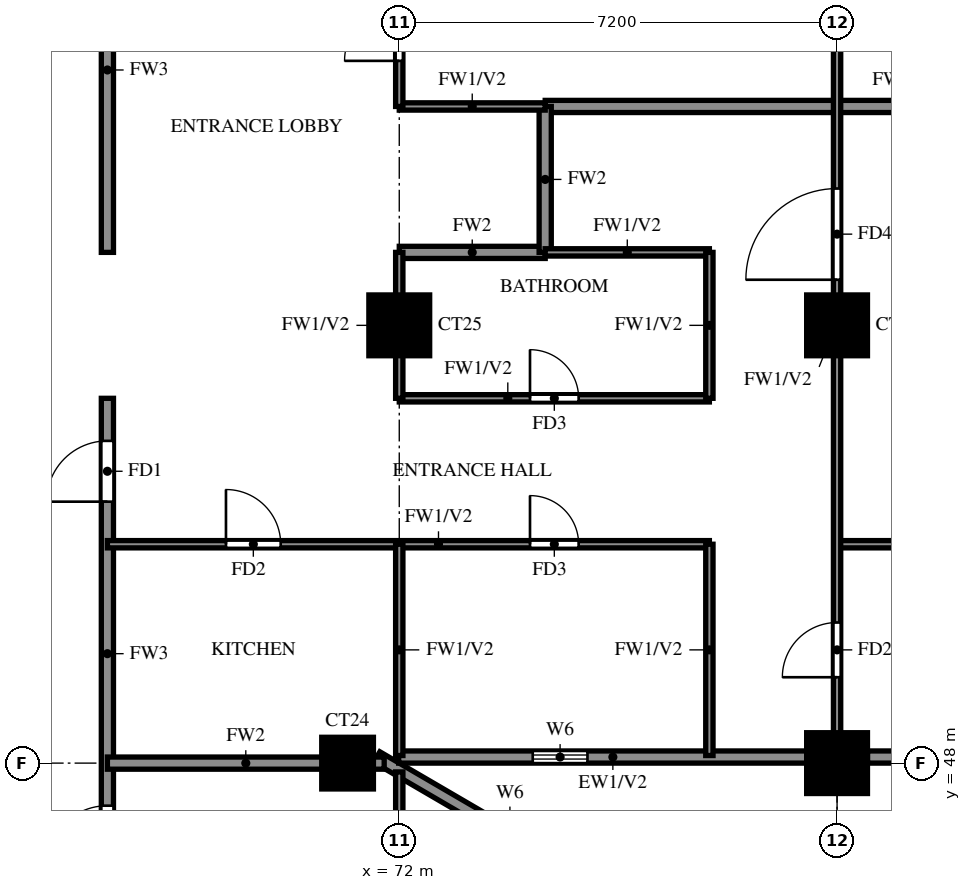
"""IFC4 building model, lengths in metres.
Left out: names, types, materials, properties, quantities, classifications, styles, units other than length and angle.
Written with IfcOpenShell. Run it as: python <this file> out.ifc"""

import sys

from ifc_helpers import new_model, si_unit, direction, frame, frame_2d, origin, origin_2d, place, context, subcontext, project, spatial, rectangle, extrude, source, transform, mapped, element, fill, save


model = new_model("IFC4")
c1 = context("Model", 3, precision=1e-05, world=origin(), true_north=direction((0.0, 1.0)))
c2 = subcontext(c1, "Body", "Model", "MODEL_VIEW")
j1 = project(units=[si_unit("LENGTHUNIT", "METRE"), si_unit("PLANEANGLEUNIT", "RADIAN")], contexts=[c1])
p1 = place(None, origin())
s1 = spatial("IfcSite", under=j1, at=p1, CompositionType="ELEMENT")
p2 = place(p1, origin())
s2 = spatial("IfcBuilding", under=s1, at=p2, CompositionType="ELEMENT")
p3 = place(p2, frame((0.0, 0.0, 146.5)))
s3 = spatial("IfcBuildingStorey", under=s2, at=p3, CompositionType="ELEMENT", Elevation=146.5)
m1 = source(origin(), c2, "Body", "SweptSolid", [
    extrude(rectangle(XDim=0.85, YDim=0.85, at=origin_2d()), origin(), (0.0, 0.0, 1.0), 3.2),
])
p4 = place(p3, frame((71.15, 48.0, 0.0), z_axis=(0.0, 0.0, 1.0), x_axis=(1.0, 0.0, 0.0)))
e1 = element("IfcColumn", 1, at=p4, inside=s3, PredefinedType="COLUMN", context=c2, shape_type="MappedRepresentation", body=[
    mapped(m1, transform((0.0, 0.0, 0.0))),
])
m2 = source(origin(), c2, "Body", "SweptSolid", [
    extrude(rectangle(XDim=1.0, YDim=1.0, at=origin_2d()), origin(), (0.0, 0.0, 1.0), 3.2),
])
for number, where, z_axis, x_axis in (
    (2, (79.2, 48.0, 0.0), (0.0, 0.0, 1.0), (1.0, 0.0, 0.0)),
    (3, (72.0, 55.2, 0.0), (0.0, 0.0, 1.0), (1.0, 0.0, 0.0)),
    (4, (79.2, 55.2, 0.0), (0.0, 0.0, 1.0), (1.0, 0.0, 0.0)),
):
    element("IfcColumn", number, at=place(p3, frame(where, z_axis=z_axis, x_axis=x_axis)), inside=s3, PredefinedType="COLUMN", context=c2, shape_type="MappedRepresentation", body=[
        mapped(m2, transform((0.0, 0.0, 0.0))),
    ])
p5 = place(p3, frame((85.719, 39.881, 0.0), z_axis=(0.0, 0.0, 1.0), x_axis=(-0.86377618652, 0.503875678716, 0.0)))
e5 = element("IfcWall", 5, at=p5, inside=s3, PredefinedType="SOLIDWALL", context=c2, shape_type="SweptSolid", body=[
    extrude(rectangle(XDim=16.311, YDim=0.2, at=frame_2d((8.156, 0.0))), origin(), (0.0, 0.0, 1.0), 3.2),
])
p6 = place(p5, frame((13.326, 0.0, 1.5)))
e6 = element("IfcOpeningElement", 6, at=p6, cuts=e5, PredefinedType="OPENING", context=c2, shape_type="SweptSolid", body=[
    extrude(rectangle(XDim=0.9, YDim=0.9, at=frame_2d((0.45, 0.45))), frame((0.0, 0.11, 0.0), z_axis=(0.0, -1.0, 0.0), x_axis=(1.0, 0.0, 0.0)), (0.0, 0.0, 1.0), 0.22),
])
p7 = place(p3, frame((71.99, 48.1, 0.0), z_axis=(0.0, 0.0, 1.0), x_axis=(1.0, 0.0, 0.0)))
e7 = element("IfcWall", 7, at=p7, inside=s3, PredefinedType="SOLIDWALL", context=c2, shape_type="SweptSolid", body=[
    extrude(rectangle(XDim=6.71, YDim=0.2, at=frame_2d((3.355, 0.0))), origin(), (0.0, 0.0, 1.0), 3.2),
])
p8 = place(p7, frame((2.205, 0.0, 1.5)))
e8 = element("IfcOpeningElement", 8, at=p8, cuts=e7, PredefinedType="OPENING", context=c2, shape_type="SweptSolid", body=[
    extrude(rectangle(XDim=0.9, YDim=0.9, at=frame_2d((0.45, 0.45))), frame((0.0, 0.11, 0.0), z_axis=(0.0, -1.0, 0.0), x_axis=(1.0, 0.0, 0.0)), (0.0, 0.0, 1.0), 0.22),
])
p9 = place(p3, frame((79.7, 48.1, 0.0), z_axis=(0.0, 0.0, 1.0), x_axis=(1.0, 0.0, 0.0)))
e9 = element("IfcWall", 9, at=p9, inside=s3, PredefinedType="SOLIDWALL", context=c2, shape_type="SweptSolid", body=[
    extrude(rectangle(XDim=5.675, YDim=0.2, at=frame_2d((2.837, 0.0))), origin(), (0.0, 0.0, 1.0), 3.2),
])
p10 = place(p9, frame((1.637, 0.0, 0.6)))
e10 = element("IfcOpeningElement", 10, at=p10, cuts=e9, PredefinedType="OPENING", context=c2, shape_type="SweptSolid", body=[
    extrude(rectangle(XDim=2.4, YDim=2.4, at=frame_2d((1.2, 1.2))), frame((0.0, 0.11, 0.0), z_axis=(0.0, -1.0, 0.0), x_axis=(1.0, 0.0, 0.0)), (0.0, 0.0, 1.0), 0.22),
])
p11 = place(p3, frame((67.2, 45.6, 0.0), z_axis=(0.0, 0.0, 1.0), x_axis=(0.0, 1.0, 0.0)))
e11 = element("IfcWall", 11, at=p11, inside=s3, PredefinedType="SOLIDWALL", context=c2, shape_type="SweptSolid", body=[
    extrude(rectangle(XDim=8.4, YDim=0.2, at=frame_2d((4.2, 0.0))), origin(), (0.0, 0.0, 1.0), 3.2),
])
p12 = place(p11, frame((6.7, 0.0, 0.0)))
e12 = element("IfcOpeningElement", 12, at=p12, cuts=e11, PredefinedType="OPENING", context=c2, shape_type="SweptSolid", body=[
    extrude(rectangle(XDim=1.0, YDim=2.1, at=frame_2d((0.5, 1.05))), frame((0.0, 0.11, 0.0), z_axis=(0.0, -1.0, 0.0), x_axis=(1.0, 0.0, 0.0)), (0.0, 0.0, 1.0), 0.22),
])
p13 = place(p11, frame((0.7, 0.0, 0.0)))
e13 = element("IfcOpeningElement", 13, at=p13, cuts=e11, PredefinedType="OPENING", context=c2, shape_type="SweptSolid", body=[
    extrude(rectangle(XDim=1.0, YDim=2.1, at=frame_2d((0.5, 1.05))), frame((0.0, 0.11, 0.0), z_axis=(0.0, -1.0, 0.0), x_axis=(1.0, 0.0, 0.0)), (0.0, 0.0, 1.0), 0.22),
])
p14 = place(p3, frame((67.2, 56.4, 0.0), z_axis=(0.0, 0.0, 1.0), x_axis=(0.0, 1.0, 0.0)))
e14 = element("IfcWall", 14, at=p14, inside=s3, PredefinedType="SOLIDWALL", context=c2, shape_type="SweptSolid", body=[
    extrude(rectangle(XDim=6.0, YDim=0.2, at=frame_2d((3.0, 0.0))), origin(), (0.0, 0.0, 1.0), 3.2),
])
p15 = place(p14, frame((3.7, 0.0, 0.0)))
e15 = element("IfcOpeningElement", 15, at=p15, cuts=e14, PredefinedType="OPENING", context=c2, shape_type="SweptSolid", body=[
    extrude(rectangle(XDim=1.0, YDim=2.1, at=frame_2d((0.5, 1.05))), frame((0.0, 0.11, 0.0), z_axis=(0.0, -1.0, 0.0), x_axis=(1.0, 0.0, 0.0)), (0.0, 0.0, 1.0), 0.22),
])
p16 = place(p3, frame((67.2, 48.0, 0.0), z_axis=(0.0, 0.0, 1.0), x_axis=(1.0, 0.0, 0.0)))
e16 = element("IfcWall", 16, at=p16, inside=s3, PredefinedType="SOLIDWALL", context=c2, shape_type="SweptSolid", body=[
    extrude(rectangle(XDim=4.552, YDim=0.2, at=frame_2d((2.276, 0.0))), origin(), (0.0, 0.0, 1.0), 3.2),
])
p17 = place(p3, frame((72.0, 56.4, 0.0), z_axis=(0.0, 0.0, 1.0), x_axis=(1.0, 0.0, 0.0)))
e17 = element("IfcWall", 17, at=p17, inside=s3, PredefinedType="SOLIDWALL", context=c2, shape_type="SweptSolid", body=[
    extrude(rectangle(XDim=2.4, YDim=0.2, at=frame_2d((1.2, 0.0))), origin(), (0.0, 0.0, 1.0), 3.2),
])
p18 = place(p3, frame((74.4, 58.8, 0.0), z_axis=(0.0, 0.0, 1.0), x_axis=(1.0, 0.0, 0.0)))
e18 = element("IfcWall", 18, at=p18, inside=s3, PredefinedType="SOLIDWALL", context=c2, shape_type="SweptSolid", body=[
    extrude(rectangle(XDim=11.875, YDim=0.2, at=frame_2d((5.938, 0.0))), origin(), (0.0, 0.0, 1.0), 2.3),
])
p19 = place(p3, frame((74.4, 56.4, 0.0), z_axis=(0.0, 0.0, 1.0), x_axis=(0.0, 1.0, 0.0)))
e19 = element("IfcWall", 19, at=p19, inside=s3, PredefinedType="SOLIDWALL", context=c2, shape_type="SweptSolid", body=[
    extrude(rectangle(XDim=2.4, YDim=0.2, at=frame_2d((1.2, 0.0))), origin(), (0.0, 0.0, 1.0), 3.2),
])
p20 = place(p3, frame((67.2, 51.6, 0.0), z_axis=(0.0, 0.0, 1.0), x_axis=(1.0, 0.0, 0.0)))
e20 = element("IfcWall", 20, at=p20, inside=s3, PredefinedType="PARTITIONING", context=c2, shape_type="SweptSolid", body=[
    extrude(rectangle(XDim=9.9, YDim=0.12, at=frame_2d((4.95, 0.0))), origin(), (0.0, 0.0, 1.0), 3.2),
])
p21 = place(p20, frame((6.95, 0.0, 0.0)))
e21 = element("IfcOpeningElement", 21, at=p21, cuts=e20, PredefinedType="OPENING", context=c2, shape_type="SweptSolid", body=[
    extrude(rectangle(XDim=0.8, YDim=2.1, at=frame_2d((0.4, 1.05))), frame((0.0, 0.07, 0.0), z_axis=(0.0, -1.0, 0.0), x_axis=(1.0, 0.0, 0.0)), (0.0, 0.0, 1.0), 0.14),
])
p22 = place(p20, frame((1.95, 0.0, 0.0)))
e22 = element("IfcOpeningElement", 22, at=p22, cuts=e20, PredefinedType="OPENING", context=c2, shape_type="SweptSolid", body=[
    extrude(rectangle(XDim=0.9, YDim=2.1, at=frame_2d((0.45, 1.05))), frame((0.0, 0.07, 0.0), z_axis=(0.0, -1.0, 0.0), x_axis=(1.0, 0.0, 0.0)), (0.0, 0.0, 1.0), 0.14),
])
p23 = place(p3, frame((79.2, 51.6, 0.0), z_axis=(0.0, 0.0, 1.0), x_axis=(1.0, 0.0, 0.0)))
e23 = element("IfcWall", 23, at=p23, inside=s3, PredefinedType="PARTITIONING", context=c2, shape_type="SweptSolid", body=[
    extrude(rectangle(XDim=7.075, YDim=0.12, at=frame_2d((3.538, 0.0))), origin(), (0.0, 0.0, 1.0), 2.3),
])
p24 = place(p3, frame((72.0, 54.0, 0.0), z_axis=(0.0, 0.0, 1.0), x_axis=(1.0, 0.0, 0.0)))
e24 = element("IfcWall", 24, at=p24, inside=s3, PredefinedType="PARTITIONING", context=c2, shape_type="SweptSolid", body=[
    extrude(rectangle(XDim=5.1, YDim=0.12, at=frame_2d((2.55, 0.0))), origin(), (0.0, 0.0, 1.0), 3.2),
])
p25 = place(p24, frame((2.15, 0.0, 0.0)))
e25 = element("IfcOpeningElement", 25, at=p25, cuts=e24, PredefinedType="OPENING", context=c2, shape_type="SweptSolid", body=[
    extrude(rectangle(XDim=0.8, YDim=2.1, at=frame_2d((0.4, 1.05))), frame((0.0, 0.07, 0.0), z_axis=(0.0, -1.0, 0.0), x_axis=(1.0, 0.0, 0.0)), (0.0, 0.0, 1.0), 0.14),
])
p26 = place(p3, frame((74.4, 56.4, 0.0), z_axis=(0.0, 0.0, 1.0), x_axis=(1.0, 0.0, 0.0)))
e26 = element("IfcWall", 26, at=p26, inside=s3, PredefinedType="PARTITIONING", context=c2, shape_type="SweptSolid", body=[
    extrude(rectangle(XDim=2.7, YDim=0.12, at=frame_2d((1.35, 0.0))), origin(), (0.0, 0.0, 1.0), 3.2),
])
p27 = place(p3, frame((72.0, 58.8, 0.0), z_axis=(0.0, 0.0, 1.0), x_axis=(1.0, 0.0, 0.0)))
e27 = element("IfcWall", 27, at=p27, inside=s3, PredefinedType="PARTITIONING", context=c2, shape_type="SweptSolid", body=[
    extrude(rectangle(XDim=2.4, YDim=0.12, at=frame_2d((1.2, 0.0))), origin(), (0.0, 0.0, 1.0), 3.2),
])
p28 = place(p3, frame((72.0, 39.725, 0.0), z_axis=(0.0, 0.0, 1.0), x_axis=(0.0, 1.0, 0.0)))
e28 = element("IfcWall", 28, at=p28, inside=s3, PredefinedType="PARTITIONING", context=c2, shape_type="SweptSolid", body=[
    extrude(rectangle(XDim=8.13, YDim=0.12, at=frame_2d((4.065, 0.0))), origin(), (0.0, 0.0, 1.0), 2.3),
])
p29 = place(p28, frame((1.788, 0.0, 0.0)))
e29 = element("IfcOpeningElement", 29, at=p29, cuts=e28, PredefinedType="OPENING", context=c2, shape_type="SweptSolid", body=[
    extrude(rectangle(XDim=1.5, YDim=2.1, at=frame_2d((0.75, 1.05))), frame((0.0, 0.07, 0.0), z_axis=(0.0, -1.0, 0.0), x_axis=(1.0, 0.0, 0.0)), (0.0, 0.0, 1.0), 0.14),
])
p30 = place(p28, frame((4.575, 0.0, 0.0)))
e30 = element("IfcOpeningElement", 30, at=p30, cuts=e28, PredefinedType="OPENING", context=c2, shape_type="SweptSolid", body=[
    extrude(rectangle(XDim=0.8, YDim=2.1, at=frame_2d((0.4, 1.05))), frame((0.0, 0.07, 0.0), z_axis=(0.0, -1.0, 0.0), x_axis=(1.0, 0.0, 0.0)), (0.0, 0.0, 1.0), 0.14),
])
p31 = place(p3, frame((72.0, 48.125, 0.0), z_axis=(0.0, 0.0, 1.0), x_axis=(0.0, 1.0, 0.0)))
e31 = element("IfcWall", 31, at=p31, inside=s3, PredefinedType="PARTITIONING", context=c2, shape_type="SweptSolid", body=[
    extrude(rectangle(XDim=3.475, YDim=0.12, at=frame_2d((1.738, 0.0))), origin(), (0.0, 0.0, 1.0), 3.2),
])
p32 = place(p3, frame((72.0, 54.0, 0.0), z_axis=(0.0, 0.0, 1.0), x_axis=(0.0, 1.0, 0.0)))
e32 = element("IfcWall", 32, at=p32, inside=s3, PredefinedType="PARTITIONING", context=c2, shape_type="SweptSolid", body=[
    extrude(rectangle(XDim=2.4, YDim=0.12, at=frame_2d((1.2, 0.0))), origin(), (0.0, 0.0, 1.0), 3.2),
])
p33 = place(p3, frame((72.0, 58.8, 0.0), z_axis=(0.0, 0.0, 1.0), x_axis=(0.0, 1.0, 0.0)))
e33 = element("IfcWall", 33, at=p33, inside=s3, PredefinedType="PARTITIONING", context=c2, shape_type="SweptSolid", body=[
    extrude(rectangle(XDim=3.6, YDim=0.12, at=frame_2d((1.8, 0.0))), origin(), (0.0, 0.0, 1.0), 3.2),
])
p34 = place(p33, frame((0.75, 0.0, 0.0)))
e34 = element("IfcOpeningElement", 34, at=p34, cuts=e33, PredefinedType="OPENING", context=c2, shape_type="SweptSolid", body=[
    extrude(rectangle(XDim=0.9, YDim=2.1, at=frame_2d((0.45, 1.05))), frame((0.0, 0.07, 0.0), z_axis=(0.0, -1.0, 0.0), x_axis=(1.0, 0.0, 0.0)), (0.0, 0.0, 1.0), 0.14),
])
p35 = place(p3, frame((77.1, 48.125, 0.0), z_axis=(0.0, 0.0, 1.0), x_axis=(0.0, 1.0, 0.0)))
e35 = element("IfcWall", 35, at=p35, inside=s3, PredefinedType="PARTITIONING", context=c2, shape_type="SweptSolid", body=[
    extrude(rectangle(XDim=3.475, YDim=0.12, at=frame_2d((1.738, 0.0))), origin(), (0.0, 0.0, 1.0), 3.2),
])
p36 = place(p3, frame((77.1, 54.0, 0.0), z_axis=(0.0, 0.0, 1.0), x_axis=(0.0, 1.0, 0.0)))
e36 = element("IfcWall", 36, at=p36, inside=s3, PredefinedType="PARTITIONING", context=c2, shape_type="SweptSolid", body=[
    extrude(rectangle(XDim=2.4, YDim=0.12, at=frame_2d((1.2, 0.0))), origin(), (0.0, 0.0, 1.0), 3.2),
])
p37 = place(p3, frame((79.2, 48.125, 0.0), z_axis=(0.0, 0.0, 1.0), x_axis=(0.0, 1.0, 0.0)))
e37 = element("IfcWall", 37, at=p37, inside=s3, PredefinedType="PARTITIONING", context=c2, shape_type="SweptSolid", body=[
    extrude(rectangle(XDim=14.275, YDim=0.12, at=frame_2d((7.137, 0.0))), origin(), (0.0, 0.0, 1.0), 3.2),
])
p38 = place(p37, frame((1.288, 0.0, 0.0)))
e38 = element("IfcOpeningElement", 38, at=p38, cuts=e37, PredefinedType="OPENING", context=c2, shape_type="SweptSolid", body=[
    extrude(rectangle(XDim=0.9, YDim=2.1, at=frame_2d((0.45, 1.05))), frame((0.0, 0.07, 0.0), z_axis=(0.0, -1.0, 0.0), x_axis=(1.0, 0.0, 0.0)), (0.0, 0.0, 1.0), 0.14),
])
p39 = place(p37, frame((7.825, 0.0, 0.0)))
e39 = element("IfcOpeningElement", 39, at=p39, cuts=e37, PredefinedType="OPENING", context=c2, shape_type="SweptSolid", body=[
    extrude(rectangle(XDim=1.5, YDim=2.1, at=frame_2d((0.75, 1.05))), frame((0.0, 0.07, 0.0), z_axis=(0.0, -1.0, 0.0), x_axis=(1.0, 0.0, 0.0)), (0.0, 0.0, 1.0), 0.14),
])
p40 = place(p37, frame((12.025, 0.0, 0.0)))
e40 = element("IfcOpeningElement", 40, at=p40, cuts=e37, PredefinedType="OPENING", context=c2, shape_type="SweptSolid", body=[
    extrude(rectangle(XDim=0.9, YDim=2.1, at=frame_2d((0.45, 1.05))), frame((0.0, 0.07, 0.0), z_axis=(0.0, -1.0, 0.0), x_axis=(1.0, 0.0, 0.0)), (0.0, 0.0, 1.0), 0.14),
])
p41 = place(p8, origin())
e41 = element("IfcWindow", 41, at=p41, inside=s3, PartitioningType="SINGLE_PANEL", PredefinedType="WINDOW", context=c2, shape_type="SweptSolid", body=[
    extrude(rectangle(XDim=0.9, YDim=0.9, at=frame_2d((0.45, 0.45))), frame((0.0, 0.03, 0.0), z_axis=(0.0, -1.0, 0.0), x_axis=(1.0, 0.0, 0.0)), (0.0, 0.0, 1.0), 0.06),
])
fill(e8, e41)
p42 = place(p12, origin())
e42 = element("IfcDoor", 42, at=p42, inside=s3, OperationType="SINGLE_SWING_LEFT", PredefinedType="DOOR", context=c2, shape_type="SweptSolid", body=[
    extrude(rectangle(XDim=1.0, YDim=2.1, at=frame_2d((0.5, 1.05))), frame((0.0, 0.025, 0.0), z_axis=(0.0, -1.0, 0.0), x_axis=(1.0, 0.0, 0.0)), (0.0, 0.0, 1.0), 0.05),
])
fill(e12, e42)
p43 = place(p38, origin())
e43 = element("IfcDoor", 43, at=p43, inside=s3, OperationType="SINGLE_SWING_RIGHT", PredefinedType="DOOR", context=c2, shape_type="SweptSolid", body=[
    extrude(rectangle(XDim=0.9, YDim=2.1, at=frame_2d((0.45, 1.05))), frame((0.0, 0.025, 0.0), z_axis=(0.0, -1.0, 0.0), x_axis=(1.0, 0.0, 0.0)), (0.0, 0.0, 1.0), 0.05),
])
fill(e38, e43)
p44 = place(p39, origin())
e44 = element("IfcDoor", 44, at=p44, inside=s3, OperationType="SINGLE_SWING_RIGHT", PredefinedType="DOOR", context=c2, shape_type="SweptSolid", body=[
    extrude(rectangle(XDim=1.5, YDim=2.1, at=frame_2d((0.75, 1.05))), frame((0.0, 0.025, 0.0), z_axis=(0.0, -1.0, 0.0), x_axis=(1.0, 0.0, 0.0)), (0.0, 0.0, 1.0), 0.05),
])
fill(e39, e44)
p45 = place(p21, origin())
e45 = element("IfcDoor", 45, at=p45, inside=s3, OperationType="SINGLE_SWING_LEFT", PredefinedType="DOOR", context=c2, shape_type="SweptSolid", body=[
    extrude(rectangle(XDim=0.8, YDim=2.1, at=frame_2d((0.4, 1.05))), frame((0.0, 0.025, 0.0), z_axis=(0.0, -1.0, 0.0), x_axis=(1.0, 0.0, 0.0)), (0.0, 0.0, 1.0), 0.05),
])
fill(e21, e45)
p46 = place(p25, origin())
e46 = element("IfcDoor", 46, at=p46, inside=s3, OperationType="SINGLE_SWING_RIGHT", PredefinedType="DOOR", context=c2, shape_type="SweptSolid", body=[
    extrude(rectangle(XDim=0.8, YDim=2.1, at=frame_2d((0.4, 1.05))), frame((0.0, 0.025, 0.0), z_axis=(0.0, -1.0, 0.0), x_axis=(1.0, 0.0, 0.0)), (0.0, 0.0, 1.0), 0.05),
])
fill(e25, e46)
p47 = place(p22, origin())
e47 = element("IfcDoor", 47, at=p47, inside=s3, OperationType="SINGLE_SWING_LEFT", PredefinedType="DOOR", context=c2, shape_type="SweptSolid", body=[
    extrude(rectangle(XDim=0.9, YDim=2.1, at=frame_2d((0.45, 1.05))), frame((0.0, 0.025, 0.0), z_axis=(0.0, -1.0, 0.0), x_axis=(1.0, 0.0, 0.0)), (0.0, 0.0, 1.0), 0.05),
])
fill(e22, e47)
p48 = place(p34, origin())
e48 = element("IfcDoor", 48, at=p48, inside=s3, OperationType="SINGLE_SWING_LEFT", PredefinedType="DOOR", context=c2, shape_type="SweptSolid", body=[
    extrude(rectangle(XDim=0.9, YDim=2.1, at=frame_2d((0.45, 1.05))), frame((0.0, 0.025, 0.0), z_axis=(0.0, -1.0, 0.0), x_axis=(1.0, 0.0, 0.0)), (0.0, 0.0, 1.0), 0.05),
])
fill(e34, e48)
p49 = place(p13, origin())
e49 = element("IfcDoor", 49, at=p49, inside=s3, OperationType="SINGLE_SWING_LEFT", PredefinedType="DOOR", context=c2, shape_type="SweptSolid", body=[
    extrude(rectangle(XDim=1.0, YDim=2.1, at=frame_2d((0.5, 1.05))), frame((0.0, 0.025, 0.0), z_axis=(0.0, -1.0, 0.0), x_axis=(1.0, 0.0, 0.0)), (0.0, 0.0, 1.0), 0.05),
])
fill(e13, e49)
save(model, sys.argv[1])
